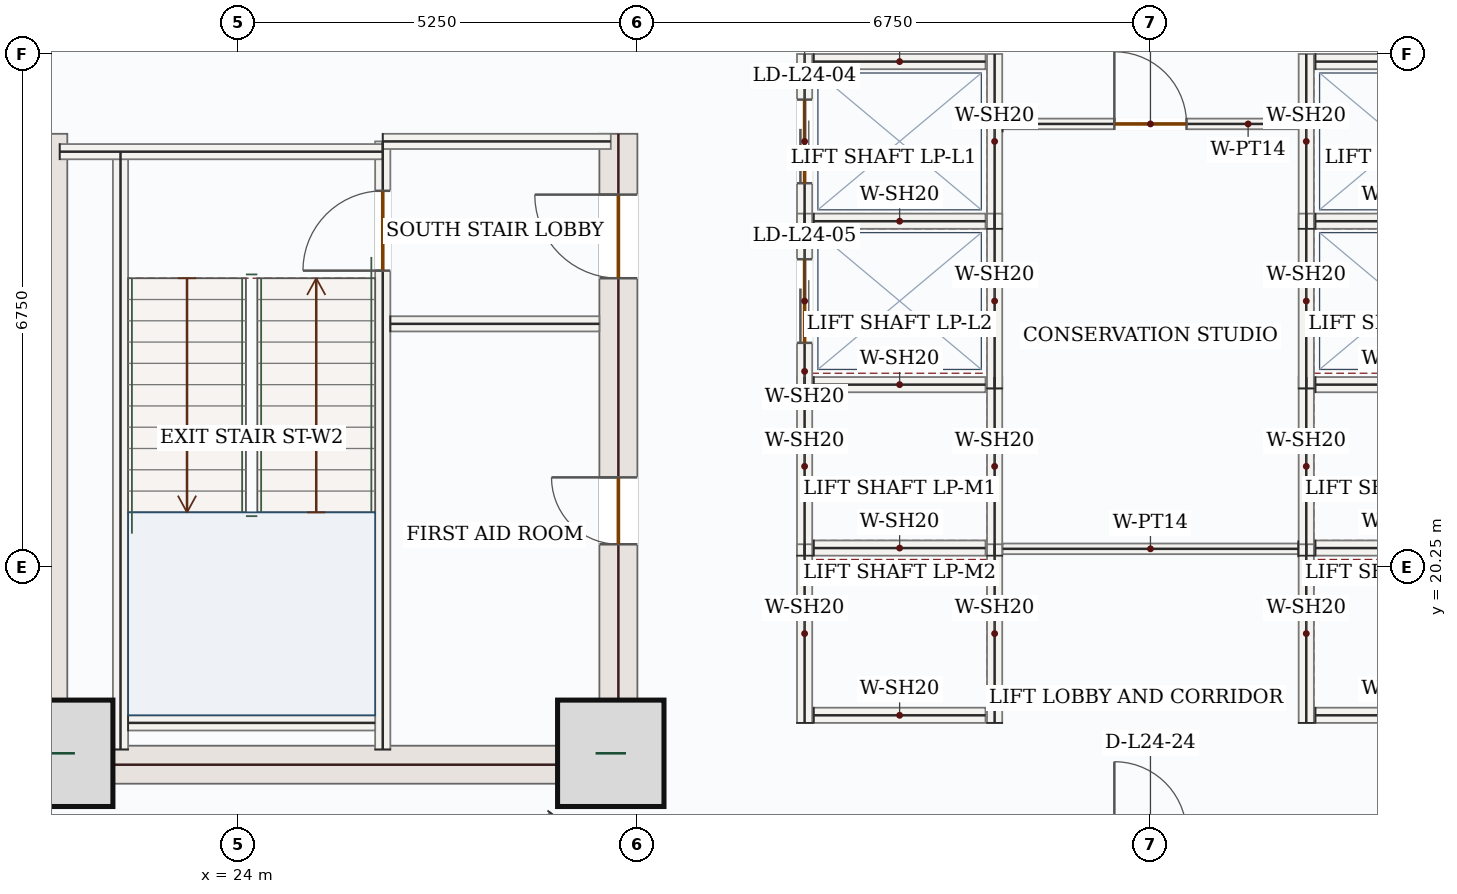
"""IFC4 building model, lengths in metres.
Left out: names, types, materials, properties, quantities, classifications, styles, units other than length and angle.
Written with IfcOpenShell. Run it as: python <this file> out.ifc"""

import sys

from ifc_helpers import new_model, si_unit, direction, frame, frame_2d, origin, origin_2d, place, context, subcontext, project, spatial, rectangle, extrude, source, transform, mapped, element, fill, save


model = new_model("IFC4")
c1 = context("Model", 3, precision=1e-05, world=origin(), true_north=direction((0.0, 1.0)))
c2 = subcontext(c1, "Body", "Model", "MODEL_VIEW")
j1 = project(units=[si_unit("LENGTHUNIT", "METRE"), si_unit("PLANEANGLEUNIT", "RADIAN")], contexts=[c1])
p1 = place(None, origin())
s1 = spatial("IfcSite", under=j1, at=p1, CompositionType="ELEMENT")
p2 = place(p1, origin())
s2 = spatial("IfcBuilding", under=s1, at=p2, CompositionType="ELEMENT")
p3 = place(p2, frame((0.0, 0.0, 108.9)))
s3 = spatial("IfcBuildingStorey", under=s2, at=p3, CompositionType="ELEMENT", Elevation=108.9)
m1 = source(origin(), c2, "Body", "SweptSolid", [
    extrude(rectangle(XDim=8.55, YDim=0.5, at=frame_2d((4.275, 0.0))), origin(), (0.0, 0.0, 1.0), 3.95),
])
p4 = place(p3, frame((21.5, 17.4, 0.0), z_axis=(0.0, 0.0, 1.0), x_axis=(0.0, 1.0, 0.0)))
e1 = element("IfcWall", 1, at=p4, inside=s3, PredefinedType="SHEAR", context=c2, shape_type="MappedRepresentation", body=[
    mapped(m1, transform((0.0, 0.0, 0.0), x_axis=(1.0, 0.0, 0.0), y_axis=(0.0, 1.0, 0.0), z_axis=(0.0, 0.0, 1.0), scale=1.0)),
])
p5 = place(p3, frame((29.0, 17.4, 0.0), z_axis=(0.0, 0.0, 1.0), x_axis=(0.0, 1.0, 0.0)))
e2 = element("IfcWall", 2, at=p5, inside=s3, PredefinedType="SHEAR", context=c2, shape_type="SweptSolid", body=[
    extrude(rectangle(XDim=8.55, YDim=0.5, at=frame_2d((4.275, 0.0))), origin(), (0.0, 0.0, 1.0), 3.95),
])
p6 = place(p5, frame((6.65, 0.0, 0.0)))
e3 = element("IfcOpeningElement", 3, at=p6, cuts=e2, PredefinedType="OPENING", context=c2, shape_type="SweptSolid", body=[
    extrude(rectangle(XDim=1.1, YDim=2.2, at=frame_2d((0.55, 1.1))), frame((0.0, 0.26, 0.0), z_axis=(0.0, -1.0, 0.0), x_axis=(1.0, 0.0, 0.0)), (0.0, 0.0, 1.0), 0.52),
])
p7 = place(p5, frame((3.15, 0.0, 0.0)))
e4 = element("IfcOpeningElement", 4, at=p7, cuts=e2, PredefinedType="OPENING", context=c2, shape_type="SweptSolid", body=[
    extrude(rectangle(XDim=0.88, YDim=2.1, at=frame_2d((0.44, 1.05))), frame((0.0, 0.26, 0.0), z_axis=(0.0, -1.0, 0.0), x_axis=(1.0, 0.0, 0.0)), (0.0, 0.0, 1.0), 0.52),
])
m2 = source(origin(), c2, "Body", "SweptSolid", [
    extrude(rectangle(XDim=7.0, YDim=0.5, at=frame_2d((3.5, 0.0))), origin(), (0.0, 0.0, 1.0), 3.95),
])
p8 = place(p3, frame((21.75, 17.65, 0.0), z_axis=(0.0, 0.0, 1.0), x_axis=(1.0, 0.0, 0.0)))
e5 = element("IfcWall", 5, at=p8, inside=s3, PredefinedType="SHEAR", context=c2, shape_type="MappedRepresentation", body=[
    mapped(m2, transform((0.0, 0.0, 0.0), x_axis=(1.0, 0.0, 0.0), y_axis=(0.0, 1.0, 0.0), z_axis=(0.0, 0.0, 1.0), scale=1.0)),
])
m3 = source(origin(), c2, "Body", "SweptSolid", [
    extrude(rectangle(XDim=1.4, YDim=1.4, at=origin_2d()), origin(), (0.0, 0.0, 1.0), 4.2),
])
for number, where, z_axis, x_axis in (
    (6, (21.65, 17.8, 0.0), (0.0, 0.0, 1.0), (1.0, 0.0, 0.0)),
    (7, (28.9, 17.8, 0.0), (0.0, 0.0, 1.0), (1.0, 0.0, 0.0)),
):
    element("IfcColumn", number, at=place(p3, frame(where, z_axis=z_axis, x_axis=x_axis)), inside=s3, PredefinedType="COLUMN", context=c2, shape_type="MappedRepresentation", body=[
        mapped(m3, transform((0.0, 0.0, 0.0), x_axis=(1.0, 0.0, 0.0), y_axis=(0.0, 1.0, 0.0), z_axis=(0.0, 0.0, 1.0), scale=1.0)),
    ])
p9 = place(p3, frame((22.658, 14.74, 0.0), z_axis=(0.0, 0.0, 1.0), x_axis=(-0.707106781187, 0.707106781187, 0.0)))
e8 = element("IfcWall", 8, at=p9, inside=s3, PredefinedType="SOLIDWALL", context=c2, shape_type="SweptSolid", body=[
    extrude(rectangle(XDim=4.99, YDim=0.32, at=frame_2d((2.495, 0.0))), origin(), (0.0, 0.0, 1.0), 3.95),
])
p10 = place(p9, frame((1.295, 0.0, 0.85)))
e9 = element("IfcOpeningElement", 9, at=p10, cuts=e8, PredefinedType="OPENING", context=c2, shape_type="SweptSolid", body=[
    extrude(rectangle(XDim=2.4, YDim=1.8, at=frame_2d((1.2, 0.9))), frame((0.0, 0.17, 0.0), z_axis=(0.0, -1.0, 0.0), x_axis=(1.0, 0.0, 0.0)), (0.0, 0.0, 1.0), 0.34),
])
m4 = source(origin(), c2, "Body", "SweptSolid", [
    extrude(rectangle(XDim=7.87, YDim=0.2, at=frame_2d((3.935, 0.0))), origin(), (0.0, 0.0, 1.0), 3.95),
])
p11 = place(p3, frame((22.45, 17.85, 0.0), z_axis=(0.0, 0.0, 1.0), x_axis=(0.0, 1.0, 0.0)))
e10 = element("IfcWall", 10, at=p11, inside=s3, PredefinedType="SOLIDWALL", context=c2, shape_type="MappedRepresentation", body=[
    mapped(m4, transform((0.0, 0.0, 0.0), x_axis=(1.0, 0.0, 0.0), y_axis=(0.0, 1.0, 0.0), z_axis=(0.0, 0.0, 1.0), scale=1.0)),
])
p12 = place(p3, frame((25.9, 17.85, 0.0), z_axis=(0.0, 0.0, 1.0), x_axis=(0.0, 1.0, 0.0)))
e11 = element("IfcWall", 11, at=p12, inside=s3, PredefinedType="SOLIDWALL", context=c2, shape_type="SweptSolid", body=[
    extrude(rectangle(XDim=8.0, YDim=0.2, at=frame_2d((4.0, 0.0))), origin(), (0.0, 0.0, 1.0), 3.95),
])
p13 = place(p12, frame((6.3, 0.0, 0.0)))
e12 = element("IfcOpeningElement", 12, at=p13, cuts=e11, PredefinedType="OPENING", context=c2, shape_type="SweptSolid", body=[
    extrude(rectangle(XDim=1.05, YDim=2.15, at=frame_2d((0.525, 1.075))), frame((0.0, 0.11, 0.0), z_axis=(0.0, -1.0, 0.0), x_axis=(1.0, 0.0, 0.0)), (0.0, 0.0, 1.0), 0.22),
])
m5 = source(origin(), c2, "Body", "SweptSolid", [
    extrude(rectangle(XDim=4.25, YDim=0.2, at=frame_2d((2.125, 0.0))), origin(), (0.0, 0.0, 1.0), 3.95),
])
p14 = place(p3, frame((21.65, 25.715, 0.0), z_axis=(0.0, 0.0, 1.0), x_axis=(1.0, 0.0, 0.0)))
e13 = element("IfcWall", 13, at=p14, inside=s3, PredefinedType="SOLIDWALL", context=c2, shape_type="MappedRepresentation", body=[
    mapped(m5, transform((0.0, 0.0, 0.0), x_axis=(1.0, 0.0, 0.0), y_axis=(0.0, 1.0, 0.0), z_axis=(0.0, 0.0, 1.0), scale=1.0)),
])
m6 = source(origin(), c2, "Body", "SweptSolid", [
    extrude(rectangle(XDim=3.0, YDim=0.2, at=frame_2d((1.5, 0.0))), origin(), (0.0, 0.0, 1.0), 3.95),
])
p15 = place(p3, frame((25.9, 25.85, 0.0), z_axis=(0.0, 0.0, 1.0), x_axis=(1.0, 0.0, 0.0)))
e14 = element("IfcWall", 14, at=p15, inside=s3, PredefinedType="SOLIDWALL", context=c2, shape_type="MappedRepresentation", body=[
    mapped(m6, transform((0.0, 0.0, 0.0), x_axis=(1.0, 0.0, 0.0), y_axis=(0.0, 1.0, 0.0), z_axis=(0.0, 0.0, 1.0), scale=1.0)),
])
m7 = source(origin(), c2, "Body", "SweptSolid", [
    extrude(rectangle(XDim=3.25, YDim=0.2, at=frame_2d((1.625, 0.0))), origin(), (0.0, 0.0, 1.0), 3.95),
])
p16 = place(p3, frame((22.55, 18.2, 0.0), z_axis=(0.0, 0.0, 1.0), x_axis=(1.0, 0.0, 0.0)))
e15 = element("IfcWall", 15, at=p16, inside=s3, PredefinedType="SOLIDWALL", context=c2, shape_type="MappedRepresentation", body=[
    mapped(m7, transform((0.0, 0.0, 0.0), x_axis=(1.0, 0.0, 0.0), y_axis=(0.0, 1.0, 0.0), z_axis=(0.0, 0.0, 1.0), scale=1.0)),
])
m8 = source(origin(), c2, "Body", "SweptSolid", [
    extrude(rectangle(XDim=2.75, YDim=0.2, at=frame_2d((1.375, 0.0))), origin(), (0.0, 0.0, 1.0), 3.95),
])
p17 = place(p3, frame((26.0, 23.45, 0.0), z_axis=(0.0, 0.0, 1.0), x_axis=(1.0, 0.0, 0.0)))
e16 = element("IfcWall", 16, at=p17, inside=s3, PredefinedType="SOLIDWALL", context=c2, shape_type="MappedRepresentation", body=[
    mapped(m8, transform((0.0, 0.0, 0.0), x_axis=(1.0, 0.0, 0.0), y_axis=(0.0, 1.0, 0.0), z_axis=(0.0, 0.0, 1.0), scale=1.0)),
])
m9 = source(origin(), c2, "Body", "SweptSolid", [
    extrude(rectangle(XDim=2.35, YDim=0.2, at=frame_2d((1.175, 0.0))), origin(), (0.0, 0.0, 1.0), 3.95),
])
for number, where, z_axis, x_axis in (
    (17, (31.45, 20.4, 0.0), (0.0, 0.0, 1.0), (0.0, 1.0, 0.0)),
    (18, (33.95, 20.4, 0.0), (0.0, 0.0, 1.0), (0.0, 1.0, 0.0)),
):
    element("IfcWall", number, at=place(p3, frame(where, z_axis=z_axis, x_axis=x_axis)), inside=s3, PredefinedType="SOLIDWALL", context=c2, shape_type="MappedRepresentation", body=[
        mapped(m9, transform((0.0, 0.0, 0.0), x_axis=(1.0, 0.0, 0.0), y_axis=(0.0, 1.0, 0.0), z_axis=(0.0, 0.0, 1.0), scale=1.0)),
    ])
m10 = source(origin(), c2, "Body", "SweptSolid", [
    extrude(rectangle(XDim=2.26, YDim=0.2, at=frame_2d((1.13, 0.0))), origin(), (0.0, 0.0, 1.0), 3.95),
])
for number, where, z_axis, x_axis in (
    (19, (31.57, 20.5, 0.0), (0.0, 0.0, 1.0), (1.0, 0.0, 0.0)),
    (20, (31.57, 22.65, 0.0), (0.0, 0.0, 1.0), (1.0, 0.0, 0.0)),
):
    element("IfcWall", number, at=place(p3, frame(where, z_axis=z_axis, x_axis=x_axis)), inside=s3, PredefinedType="SOLIDWALL", context=c2, shape_type="MappedRepresentation", body=[
        mapped(m10, transform((0.0, 0.0, 0.0), x_axis=(1.0, 0.0, 0.0), y_axis=(0.0, 1.0, 0.0), z_axis=(0.0, 0.0, 1.0), scale=1.0)),
    ])
for number, where, z_axis, x_axis in (
    (21, (31.45, 18.2, 0.0), (0.0, 0.0, 1.0), (0.0, 1.0, 0.0)),
    (22, (33.95, 18.2, 0.0), (0.0, 0.0, 1.0), (0.0, 1.0, 0.0)),
):
    element("IfcWall", number, at=place(p3, frame(where, z_axis=z_axis, x_axis=x_axis)), inside=s3, PredefinedType="SOLIDWALL", context=c2, shape_type="MappedRepresentation", body=[
        mapped(m9, transform((0.0, 0.0, 0.0), x_axis=(1.0, 0.0, 0.0), y_axis=(0.0, 1.0, 0.0), z_axis=(0.0, 0.0, 1.0), scale=1.0)),
    ])
p18 = place(p3, frame((31.57, 18.3, 0.0), z_axis=(0.0, 0.0, 1.0), x_axis=(1.0, 0.0, 0.0)))
e23 = element("IfcWall", 23, at=p18, inside=s3, PredefinedType="SOLIDWALL", context=c2, shape_type="MappedRepresentation", body=[
    mapped(m10, transform((0.0, 0.0, 0.0), x_axis=(1.0, 0.0, 0.0), y_axis=(0.0, 1.0, 0.0), z_axis=(0.0, 0.0, 1.0), scale=1.0)),
])
p19 = place(p3, frame((38.05, 20.4, 0.0), z_axis=(0.0, 0.0, 1.0), x_axis=(0.0, 1.0, 0.0)))
e24 = element("IfcWall", 24, at=p19, inside=s3, PredefinedType="SOLIDWALL", context=c2, shape_type="MappedRepresentation", body=[
    mapped(m9, transform((0.0, 0.0, 0.0), x_axis=(1.0, 0.0, 0.0), y_axis=(0.0, 1.0, 0.0), z_axis=(0.0, 0.0, 1.0), scale=1.0)),
])
for number, where, z_axis, x_axis in (
    (25, (38.17, 20.5, 0.0), (0.0, 0.0, 1.0), (1.0, 0.0, 0.0)),
    (26, (38.17, 22.65, 0.0), (0.0, 0.0, 1.0), (1.0, 0.0, 0.0)),
):
    element("IfcWall", number, at=place(p3, frame(where, z_axis=z_axis, x_axis=x_axis)), inside=s3, PredefinedType="SOLIDWALL", context=c2, shape_type="MappedRepresentation", body=[
        mapped(m10, transform((0.0, 0.0, 0.0), x_axis=(1.0, 0.0, 0.0), y_axis=(0.0, 1.0, 0.0), z_axis=(0.0, 0.0, 1.0), scale=1.0)),
    ])
p20 = place(p3, frame((38.05, 18.2, 0.0), z_axis=(0.0, 0.0, 1.0), x_axis=(0.0, 1.0, 0.0)))
e27 = element("IfcWall", 27, at=p20, inside=s3, PredefinedType="SOLIDWALL", context=c2, shape_type="MappedRepresentation", body=[
    mapped(m9, transform((0.0, 0.0, 0.0), x_axis=(1.0, 0.0, 0.0), y_axis=(0.0, 1.0, 0.0), z_axis=(0.0, 0.0, 1.0), scale=1.0)),
])
p21 = place(p3, frame((38.17, 18.3, 0.0), z_axis=(0.0, 0.0, 1.0), x_axis=(1.0, 0.0, 0.0)))
e28 = element("IfcWall", 28, at=p21, inside=s3, PredefinedType="SOLIDWALL", context=c2, shape_type="MappedRepresentation", body=[
    mapped(m10, transform((0.0, 0.0, 0.0), x_axis=(1.0, 0.0, 0.0), y_axis=(0.0, 1.0, 0.0), z_axis=(0.0, 0.0, 1.0), scale=1.0)),
])
p22 = place(p3, frame((31.45, 24.7, 0.0), z_axis=(0.0, 0.0, 1.0), x_axis=(0.0, 1.0, 0.0)))
e29 = element("IfcWall", 29, at=p22, inside=s3, PredefinedType="SOLIDWALL", context=c2, shape_type="SweptSolid", body=[
    extrude(rectangle(XDim=2.3, YDim=0.2, at=frame_2d((1.15, 0.0))), origin(), (0.0, 0.0, 1.0), 3.95),
])
p23 = place(p22, frame((0.6, 0.0, 0.0)))
e30 = element("IfcOpeningElement", 30, at=p23, cuts=e29, PredefinedType="OPENING", context=c2, shape_type="SweptSolid", body=[
    extrude(rectangle(XDim=1.1, YDim=2.15, at=frame_2d((0.55, 1.075))), frame((0.0, 0.11, 0.0), z_axis=(0.0, -1.0, 0.0), x_axis=(1.0, 0.0, 0.0)), (0.0, 0.0, 1.0), 0.22),
])
m11 = source(origin(), c2, "Body", "SweptSolid", [
    extrude(rectangle(XDim=2.3, YDim=0.2, at=frame_2d((1.15, 0.0))), origin(), (0.0, 0.0, 1.0), 3.95),
])
p24 = place(p3, frame((33.95, 24.7, 0.0), z_axis=(0.0, 0.0, 1.0), x_axis=(0.0, 1.0, 0.0)))
e31 = element("IfcWall", 31, at=p24, inside=s3, PredefinedType="SOLIDWALL", context=c2, shape_type="MappedRepresentation", body=[
    mapped(m11, transform((0.0, 0.0, 0.0), x_axis=(1.0, 0.0, 0.0), y_axis=(0.0, 1.0, 0.0), z_axis=(0.0, 0.0, 1.0), scale=1.0)),
])
for number, where, z_axis, x_axis in (
    (32, (31.57, 24.8, 0.0), (0.0, 0.0, 1.0), (1.0, 0.0, 0.0)),
    (33, (31.57, 26.9, 0.0), (0.0, 0.0, 1.0), (1.0, 0.0, 0.0)),
):
    element("IfcWall", number, at=place(p3, frame(where, z_axis=z_axis, x_axis=x_axis)), inside=s3, PredefinedType="SOLIDWALL", context=c2, shape_type="MappedRepresentation", body=[
        mapped(m10, transform((0.0, 0.0, 0.0), x_axis=(1.0, 0.0, 0.0), y_axis=(0.0, 1.0, 0.0), z_axis=(0.0, 0.0, 1.0), scale=1.0)),
    ])
p25 = place(p3, frame((31.45, 22.6, 0.0), z_axis=(0.0, 0.0, 1.0), x_axis=(0.0, 1.0, 0.0)))
e34 = element("IfcWall", 34, at=p25, inside=s3, PredefinedType="SOLIDWALL", context=c2, shape_type="SweptSolid", body=[
    extrude(rectangle(XDim=2.3, YDim=0.2, at=frame_2d((1.15, 0.0))), origin(), (0.0, 0.0, 1.0), 3.95),
])
p26 = place(p25, frame((0.6, 0.0, 0.0)))
e35 = element("IfcOpeningElement", 35, at=p26, cuts=e34, PredefinedType="OPENING", context=c2, shape_type="SweptSolid", body=[
    extrude(rectangle(XDim=1.1, YDim=2.15, at=frame_2d((0.55, 1.075))), frame((0.0, 0.11, 0.0), z_axis=(0.0, -1.0, 0.0), x_axis=(1.0, 0.0, 0.0)), (0.0, 0.0, 1.0), 0.22),
])
m12 = source(origin(), c2, "Body", "SweptSolid", [
    extrude(rectangle(XDim=2.3, YDim=0.2, at=frame_2d((1.15, 0.0))), origin(), (0.0, 0.0, 1.0), 3.95),
])
p27 = place(p3, frame((33.95, 22.6, 0.0), z_axis=(0.0, 0.0, 1.0), x_axis=(0.0, 1.0, 0.0)))
e36 = element("IfcWall", 36, at=p27, inside=s3, PredefinedType="SOLIDWALL", context=c2, shape_type="MappedRepresentation", body=[
    mapped(m12, transform((0.0, 0.0, 0.0), x_axis=(1.0, 0.0, 0.0), y_axis=(0.0, 1.0, 0.0), z_axis=(0.0, 0.0, 1.0), scale=1.0)),
])
p28 = place(p3, frame((38.05, 24.7, 0.0), z_axis=(0.0, 0.0, 1.0), x_axis=(0.0, 1.0, 0.0)))
e37 = element("IfcWall", 37, at=p28, inside=s3, PredefinedType="SOLIDWALL", context=c2, shape_type="MappedRepresentation", body=[
    mapped(m11, transform((0.0, 0.0, 0.0), x_axis=(1.0, 0.0, 0.0), y_axis=(0.0, 1.0, 0.0), z_axis=(0.0, 0.0, 1.0), scale=1.0)),
])
for number, where, z_axis, x_axis in (
    (38, (38.17, 24.8, 0.0), (0.0, 0.0, 1.0), (1.0, 0.0, 0.0)),
    (39, (38.17, 26.9, 0.0), (0.0, 0.0, 1.0), (1.0, 0.0, 0.0)),
):
    element("IfcWall", number, at=place(p3, frame(where, z_axis=z_axis, x_axis=x_axis)), inside=s3, PredefinedType="SOLIDWALL", context=c2, shape_type="MappedRepresentation", body=[
        mapped(m10, transform((0.0, 0.0, 0.0), x_axis=(1.0, 0.0, 0.0), y_axis=(0.0, 1.0, 0.0), z_axis=(0.0, 0.0, 1.0), scale=1.0)),
    ])
p29 = place(p3, frame((38.05, 22.6, 0.0), z_axis=(0.0, 0.0, 1.0), x_axis=(0.0, 1.0, 0.0)))
e40 = element("IfcWall", 40, at=p29, inside=s3, PredefinedType="SOLIDWALL", context=c2, shape_type="MappedRepresentation", body=[
    mapped(m12, transform((0.0, 0.0, 0.0), x_axis=(1.0, 0.0, 0.0), y_axis=(0.0, 1.0, 0.0), z_axis=(0.0, 0.0, 1.0), scale=1.0)),
])
p30 = place(p3, frame((34.055, 26.08, 0.0), z_axis=(0.0, 0.0, 1.0), x_axis=(1.0, 0.0, 0.0)))
e41 = element("IfcWall", 41, at=p30, inside=s3, PredefinedType="PARTITIONING", context=c2, shape_type="SweptSolid", body=[
    extrude(rectangle(XDim=3.89, YDim=0.14, at=frame_2d((1.945, 0.0))), origin(), (0.0, 0.0, 1.0), 3.95),
])
p31 = place(p30, frame((1.47, 0.0, 0.0)))
e42 = element("IfcOpeningElement", 42, at=p31, cuts=e41, PredefinedType="OPENING", context=c2, shape_type="SweptSolid", body=[
    extrude(rectangle(XDim=0.95, YDim=2.15, at=frame_2d((0.475, 1.075))), frame((0.0, 0.08, 0.0), z_axis=(0.0, -1.0, 0.0), x_axis=(1.0, 0.0, 0.0)), (0.0, 0.0, 1.0), 0.16),
])
m13 = source(origin(), c2, "Body", "SweptSolid", [
    extrude(rectangle(XDim=3.89, YDim=0.14, at=frame_2d((1.945, 0.0))), origin(), (0.0, 0.0, 1.0), 3.95),
])
p32 = place(p3, frame((37.945, 20.49, 0.0), z_axis=(0.0, 0.0, 1.0), x_axis=(-1.0, 0.0, 0.0)))
e43 = element("IfcWall", 43, at=p32, inside=s3, PredefinedType="PARTITIONING", context=c2, shape_type="MappedRepresentation", body=[
    mapped(m13, transform((0.0, 0.0, 0.0), x_axis=(1.0, 0.0, 0.0), y_axis=(0.0, 1.0, 0.0), z_axis=(0.0, 0.0, 1.0), scale=1.0)),
])
m14 = source(origin(), c2, "Body", "SweptSolid", [
    extrude(rectangle(XDim=2.629, YDim=0.14, at=frame_2d((1.315, 0.0))), origin(), (0.0, 0.0, 1.0), 3.95),
])
p33 = place(p3, frame((28.154, 16.98, 0.0), z_axis=(0.0, 0.0, 1.0), x_axis=(-0.614210560268, -0.789142184689, 0.0)))
e44 = element("IfcWall", 44, at=p33, inside=s3, PredefinedType="PARTITIONING", context=c2, shape_type="MappedRepresentation", body=[
    mapped(m14, transform((0.0, 0.0, 0.0), x_axis=(1.0, 0.0, 0.0), y_axis=(0.0, 1.0, 0.0), z_axis=(0.0, 0.0, 1.0), scale=1.0)),
])
m15 = source(origin(), c2, "Body", "SweptSolid", [
    extrude(rectangle(XDim=2.4, YDim=1.8, at=frame_2d((1.2, 0.9))), frame((0.0, 0.03, 0.0), z_axis=(0.0, -1.0, 0.0), x_axis=(1.0, 0.0, 0.0)), (0.0, 0.0, 1.0), 0.06),
])
p34 = place(p10, origin())
e45 = element("IfcWindow", 45, at=p34, inside=s3, PartitioningType="DOUBLE_PANEL_VERTICAL", PredefinedType="WINDOW", context=c2, shape_type="MappedRepresentation", body=[
    mapped(m15, transform((0.0, 0.0, 0.0), x_axis=(1.0, 0.0, 0.0), y_axis=(0.0, 1.0, 0.0), z_axis=(0.0, 0.0, 1.0), scale=1.0)),
])
fill(e9, e45)
m16 = source(origin(), c2, "Body", "SweptSolid", [
    extrude(rectangle(XDim=1.05, YDim=2.15, at=frame_2d((0.525, 1.075))), frame((0.0, 0.025, 0.0), z_axis=(0.0, -1.0, 0.0), x_axis=(1.0, 0.0, 0.0)), (0.0, 0.0, 1.0), 0.05),
])
p35 = place(p13, origin())
e46 = element("IfcDoor", 46, at=p35, inside=s3, OperationType="SINGLE_SWING_LEFT", PredefinedType="DOOR", context=c2, shape_type="MappedRepresentation", body=[
    mapped(m16, transform((0.0, 0.0, 0.0), x_axis=(1.0, 0.0, 0.0), y_axis=(0.0, 1.0, 0.0), z_axis=(0.0, 0.0, 1.0), scale=1.0)),
])
fill(e12, e46)
m17 = source(origin(), c2, "Body", "SweptSolid", [
    extrude(rectangle(XDim=1.1, YDim=2.2, at=frame_2d((0.55, 1.1))), frame((0.0, 0.025, 0.0), z_axis=(0.0, -1.0, 0.0), x_axis=(1.0, 0.0, 0.0)), (0.0, 0.0, 1.0), 0.05),
])
p36 = place(p6, origin())
e47 = element("IfcDoor", 47, at=p36, inside=s3, OperationType="SINGLE_SWING_RIGHT", PredefinedType="DOOR", context=c2, shape_type="MappedRepresentation", body=[
    mapped(m17, transform((0.0, 0.0, 0.0), x_axis=(1.0, 0.0, 0.0), y_axis=(0.0, 1.0, 0.0), z_axis=(0.0, 0.0, 1.0), scale=1.0)),
])
fill(e3, e47)
m18 = source(origin(), c2, "Body", "SweptSolid", [
    extrude(rectangle(XDim=0.88, YDim=2.1, at=frame_2d((0.44, 1.05))), frame((0.0, 0.025, 0.0), z_axis=(0.0, -1.0, 0.0), x_axis=(1.0, 0.0, 0.0)), (0.0, 0.0, 1.0), 0.05),
])
p37 = place(p7, origin())
e48 = element("IfcDoor", 48, at=p37, inside=s3, OperationType="SINGLE_SWING_RIGHT", PredefinedType="DOOR", context=c2, shape_type="MappedRepresentation", body=[
    mapped(m18, transform((0.0, 0.0, 0.0), x_axis=(1.0, 0.0, 0.0), y_axis=(0.0, 1.0, 0.0), z_axis=(0.0, 0.0, 1.0), scale=1.0)),
])
fill(e4, e48)
m19 = source(origin(), c2, "Body", "SweptSolid", [
    extrude(rectangle(XDim=1.1, YDim=2.15, at=frame_2d((0.55, 1.075))), frame((0.0, 0.025, 0.0), z_axis=(0.0, -1.0, 0.0), x_axis=(1.0, 0.0, 0.0)), (0.0, 0.0, 1.0), 0.05),
])
p38 = place(p23, origin())
e49 = element("IfcDoor", 49, at=p38, inside=s3, OperationType="DOUBLE_DOOR_SLIDING", PredefinedType="DOOR", context=c2, shape_type="MappedRepresentation", body=[
    mapped(m19, transform((0.0, 0.0, 0.0), x_axis=(1.0, 0.0, 0.0), y_axis=(0.0, 1.0, 0.0), z_axis=(0.0, 0.0, 1.0), scale=1.0)),
])
fill(e30, e49)
p39 = place(p26, origin())
e50 = element("IfcDoor", 50, at=p39, inside=s3, OperationType="DOUBLE_DOOR_SLIDING", PredefinedType="DOOR", context=c2, shape_type="MappedRepresentation", body=[
    mapped(m19, transform((0.0, 0.0, 0.0), x_axis=(1.0, 0.0, 0.0), y_axis=(0.0, 1.0, 0.0), z_axis=(0.0, 0.0, 1.0), scale=1.0)),
])
fill(e35, e50)
m20 = source(origin(), c2, "Body", "SweptSolid", [
    extrude(rectangle(XDim=0.95, YDim=2.15, at=frame_2d((0.475, 1.075))), frame((0.0, 0.025, 0.0), z_axis=(0.0, -1.0, 0.0), x_axis=(1.0, 0.0, 0.0)), (0.0, 0.0, 1.0), 0.05),
])
p40 = place(p31, origin())
e51 = element("IfcDoor", 51, at=p40, inside=s3, OperationType="SINGLE_SWING_LEFT", PredefinedType="DOOR", context=c2, shape_type="MappedRepresentation", body=[
    mapped(m20, transform((0.0, 0.0, 0.0), x_axis=(1.0, 0.0, 0.0), y_axis=(0.0, 1.0, 0.0), z_axis=(0.0, 0.0, 1.0), scale=1.0)),
])
fill(e42, e51)
save(model, sys.argv[1])
